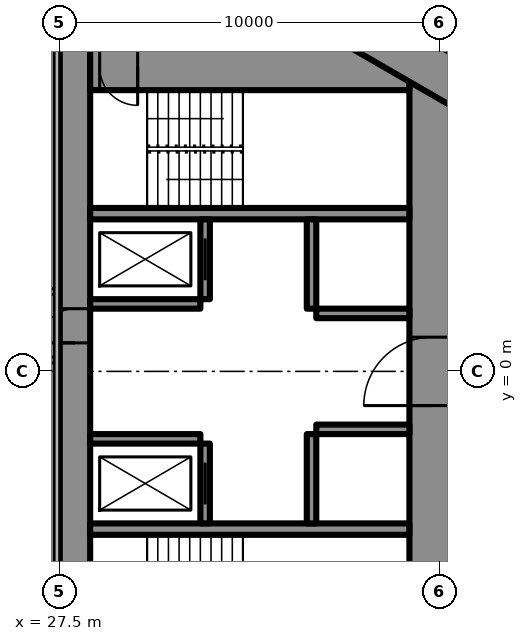
"""IFC4 building model, lengths in metres.
Left out: names, types, materials, properties, quantities, classifications, styles, units other than length and angle.
Written with IfcOpenShell. Run it as: python <this file> out.ifc"""

import sys

from ifc_helpers import new_model, si_unit, direction, frame, frame_2d, origin, place, context, subcontext, project, spatial, rectangle, extrude, element, fill, save


model = new_model("IFC4")
c1 = context("Model", 3, precision=1e-05, world=origin(), true_north=direction((0.0, 1.0)))
c2 = subcontext(c1, "Body", "Model", "MODEL_VIEW")
j1 = project(units=[si_unit("LENGTHUNIT", "METRE"), si_unit("PLANEANGLEUNIT", "RADIAN")], contexts=[c1])
p1 = place(None, origin())
s1 = spatial("IfcSite", under=j1, at=p1, CompositionType="ELEMENT")
p2 = place(p1, origin())
s2 = spatial("IfcBuilding", under=s1, at=p2, CompositionType="ELEMENT")
p3 = place(p2, frame((0.0, 0.0, 222.5)))
s3 = spatial("IfcBuildingStorey", under=s2, at=p3, CompositionType="ELEMENT", Elevation=222.5)
p4 = place(p3, frame((27.9, -8.6, 0.0), z_axis=(0.0, 0.0, 1.0), x_axis=(0.0, 1.0, 0.0)))
e1 = element("IfcWall", 1, at=p4, inside=s3, PredefinedType="SHEAR", context=c2, shape_type="SweptSolid", body=[
    extrude(rectangle(XDim=17.2, YDim=0.8, at=frame_2d((8.6, 0.0))), origin(), (0.0, 0.0, 1.0), 3.6),
])
p5 = place(p4, frame((9.35, 0.0, 0.0)))
e2 = element("IfcOpeningElement", 2, at=p5, cuts=e1, PredefinedType="OPENING", context=c2, shape_type="SweptSolid", body=[
    extrude(rectangle(XDim=0.9, YDim=2.2, at=frame_2d((0.45, 1.1))), frame((0.0, 0.41, 0.0), z_axis=(0.0, -1.0, 0.0), x_axis=(1.0, 0.0, 0.0)), (0.0, 0.0, 1.0), 0.82),
])
p6 = place(p3, frame((37.3, -8.6, 0.0), z_axis=(0.0, 0.0, 1.0), x_axis=(0.0, 1.0, 0.0)))
e3 = element("IfcWall", 3, at=p6, inside=s3, PredefinedType="SHEAR", context=c2, shape_type="SweptSolid", body=[
    extrude(rectangle(XDim=17.2, YDim=1.2, at=frame_2d((8.6, 0.0))), origin(), (0.0, 0.0, 1.0), 3.6),
])
p7 = place(p6, frame((7.7, 0.0, 0.0)))
e4 = element("IfcOpeningElement", 4, at=p7, cuts=e3, PredefinedType="OPENING", context=c2, shape_type="SweptSolid", body=[
    extrude(rectangle(XDim=1.8, YDim=2.2, at=frame_2d((0.9, 1.1))), frame((0.0, 0.61, 0.0), z_axis=(0.0, -1.0, 0.0), x_axis=(1.0, 0.0, 0.0)), (0.0, 0.0, 1.0), 1.22),
])
p8 = place(p3, frame((28.3, 8.0, 0.0), z_axis=(0.0, 0.0, 1.0), x_axis=(1.0, 0.0, 0.0)))
e5 = element("IfcWall", 5, at=p8, inside=s3, PredefinedType="SHEAR", context=c2, shape_type="SweptSolid", body=[
    extrude(rectangle(XDim=8.4, YDim=1.2, at=frame_2d((4.2, 0.0))), origin(), (0.0, 0.0, 1.0), 3.6),
])
p9 = place(p8, frame((0.25, 0.0, 0.0)))
e6 = element("IfcOpeningElement", 6, at=p9, cuts=e5, PredefinedType="OPENING", context=c2, shape_type="SweptSolid", body=[
    extrude(rectangle(XDim=1.0, YDim=2.2, at=frame_2d((0.5, 1.1))), frame((0.0, 0.61, 0.0), z_axis=(0.0, -1.0, 0.0), x_axis=(1.0, 0.0, 0.0)), (0.0, 0.0, 1.0), 1.22),
])
for number, where, z_axis, x_axis in (
    (7, (28.3, -4.15, 0.0), (0.0, 0.0, 1.0), (1.0, 0.0, 0.0)),
    (8, (28.3, 4.15, 0.0), (0.0, 0.0, 1.0), (1.0, 0.0, 0.0)),
):
    element("IfcWall", number, at=place(p3, frame(where, z_axis=z_axis, x_axis=x_axis)), inside=s3, PredefinedType="SHEAR", context=c2, shape_type="SweptSolid", body=[
        extrude(rectangle(XDim=8.4, YDim=0.3, at=frame_2d((4.2, 0.0))), origin(), (0.0, 0.0, 1.0), 3.6),
    ])
p10 = place(p3, frame((31.325, -4.0, 0.0), z_axis=(0.0, 0.0, 1.0), x_axis=(0.0, 1.0, 0.0)))
e9 = element("IfcWall", 9, at=p10, inside=s3, PredefinedType="SHEAR", context=c2, shape_type="SweptSolid", body=[
    extrude(rectangle(XDim=2.1, YDim=0.25, at=frame_2d((1.05, 0.0))), origin(), (0.0, 0.0, 1.0), 3.6),
])
p11 = place(p10, frame((0.5, 0.0, 0.0)))
e10 = element("IfcOpeningElement", 10, at=p11, cuts=e9, PredefinedType="OPENING", context=c2, shape_type="SweptSolid", body=[
    extrude(rectangle(XDim=1.1, YDim=2.2, at=frame_2d((0.55, 1.1))), frame((0.0, 0.135, 0.0), z_axis=(0.0, -1.0, 0.0), x_axis=(1.0, 0.0, 0.0)), (0.0, 0.0, 1.0), 0.27),
])
p12 = place(p3, frame((34.125, -4.0, 0.0), z_axis=(0.0, 0.0, 1.0), x_axis=(0.0, 1.0, 0.0)))
e11 = element("IfcWall", 11, at=p12, inside=s3, PredefinedType="SHEAR", context=c2, shape_type="SweptSolid", body=[
    extrude(rectangle(XDim=2.35, YDim=0.25, at=frame_2d((1.175, 0.0))), origin(), (0.0, 0.0, 1.0), 3.6),
])
p13 = place(p3, frame((28.3, -1.775, 0.0), z_axis=(0.0, 0.0, 1.0), x_axis=(1.0, 0.0, 0.0)))
e12 = element("IfcWall", 12, at=p13, inside=s3, PredefinedType="SHEAR", context=c2, shape_type="SweptSolid", body=[
    extrude(rectangle(XDim=2.9, YDim=0.25, at=frame_2d((1.45, 0.0))), origin(), (0.0, 0.0, 1.0), 3.6),
])
p14 = place(p3, frame((34.25, -1.525, 0.0), z_axis=(0.0, 0.0, 1.0), x_axis=(1.0, 0.0, 0.0)))
e13 = element("IfcWall", 13, at=p14, inside=s3, PredefinedType="SHEAR", context=c2, shape_type="SweptSolid", body=[
    extrude(rectangle(XDim=2.45, YDim=0.25, at=frame_2d((1.225, 0.0))), origin(), (0.0, 0.0, 1.0), 3.6),
])
p15 = place(p3, frame((31.325, 1.9, 0.0), z_axis=(0.0, 0.0, 1.0), x_axis=(0.0, 1.0, 0.0)))
e14 = element("IfcWall", 14, at=p15, inside=s3, PredefinedType="SHEAR", context=c2, shape_type="SweptSolid", body=[
    extrude(rectangle(XDim=2.1, YDim=0.25, at=frame_2d((1.05, 0.0))), origin(), (0.0, 0.0, 1.0), 3.6),
])
p16 = place(p15, frame((0.5, 0.0, 0.0)))
e15 = element("IfcOpeningElement", 15, at=p16, cuts=e14, PredefinedType="OPENING", context=c2, shape_type="SweptSolid", body=[
    extrude(rectangle(XDim=1.1, YDim=2.2, at=frame_2d((0.55, 1.1))), frame((0.0, 0.135, 0.0), z_axis=(0.0, -1.0, 0.0), x_axis=(1.0, 0.0, 0.0)), (0.0, 0.0, 1.0), 0.27),
])
p17 = place(p3, frame((34.125, 1.65, 0.0), z_axis=(0.0, 0.0, 1.0), x_axis=(0.0, 1.0, 0.0)))
e16 = element("IfcWall", 16, at=p17, inside=s3, PredefinedType="SHEAR", context=c2, shape_type="SweptSolid", body=[
    extrude(rectangle(XDim=2.35, YDim=0.25, at=frame_2d((1.175, 0.0))), origin(), (0.0, 0.0, 1.0), 3.6),
])
p18 = place(p3, frame((28.3, 1.775, 0.0), z_axis=(0.0, 0.0, 1.0), x_axis=(1.0, 0.0, 0.0)))
e17 = element("IfcWall", 17, at=p18, inside=s3, PredefinedType="SHEAR", context=c2, shape_type="SweptSolid", body=[
    extrude(rectangle(XDim=2.9, YDim=0.25, at=frame_2d((1.45, 0.0))), origin(), (0.0, 0.0, 1.0), 3.6),
])
p19 = place(p3, frame((34.25, 1.525, 0.0), z_axis=(0.0, 0.0, 1.0), x_axis=(1.0, 0.0, 0.0)))
e18 = element("IfcWall", 18, at=p19, inside=s3, PredefinedType="SHEAR", context=c2, shape_type="SweptSolid", body=[
    extrude(rectangle(XDim=2.45, YDim=0.25, at=frame_2d((1.225, 0.0))), origin(), (0.0, 0.0, 1.0), 3.6),
])
p20 = place(p3, frame((27.2, -13.8, 0.0), z_axis=(0.0, 0.0, 1.0), x_axis=(0.866027159892, 0.499996958321, 0.0)))
e19 = element("IfcWall", 19, at=p20, inside=s3, PredefinedType="SHEAR", context=c2, shape_type="SweptSolid", body=[
    extrude(rectangle(XDim=27.947, YDim=1.2, at=frame_2d((13.973, 0.0))), origin(), (0.0, 0.0, 1.0), 3.6),
])
p21 = place(p20, frame((4.6, 0.0, 0.0)))
e20 = element("IfcOpeningElement", 20, at=p21, cuts=e19, PredefinedType="OPENING", context=c2, shape_type="SweptSolid", body=[
    extrude(rectangle(XDim=1.0, YDim=2.2, at=frame_2d((0.5, 1.1))), frame((0.0, 0.61, 0.0), z_axis=(0.0, -1.0, 0.0), x_axis=(1.0, 0.0, 0.0)), (0.0, 0.0, 1.0), 1.22),
])
p22 = place(p20, frame((13.395, 0.0, 0.0)))
e21 = element("IfcOpeningElement", 21, at=p22, cuts=e19, PredefinedType="OPENING", context=c2, shape_type="SweptSolid", body=[
    extrude(rectangle(XDim=1.8, YDim=2.2, at=frame_2d((0.9, 1.1))), frame((0.0, 0.61, 0.0), z_axis=(0.0, -1.0, 0.0), x_axis=(1.0, 0.0, 0.0)), (0.0, 0.0, 1.0), 1.22),
])
p23 = place(p3, frame((27.2, 13.8, 0.0), z_axis=(0.0, 0.0, 1.0), x_axis=(0.866024515034, -0.500001539357, 0.0)))
e22 = element("IfcWall", 22, at=p23, inside=s3, PredefinedType="SHEAR", context=c2, shape_type="SweptSolid", body=[
    extrude(rectangle(XDim=26.907, YDim=1.2, at=frame_2d((13.454, 0.0))), origin(), (0.0, 0.0, 1.0), 3.6),
])
p24 = place(p23, frame((4.6, 0.0, 0.0)))
e23 = element("IfcOpeningElement", 23, at=p24, cuts=e22, PredefinedType="OPENING", context=c2, shape_type="SweptSolid", body=[
    extrude(rectangle(XDim=1.0, YDim=2.2, at=frame_2d((0.5, 1.1))), frame((0.0, 0.61, 0.0), z_axis=(0.0, -1.0, 0.0), x_axis=(1.0, 0.0, 0.0)), (0.0, 0.0, 1.0), 1.22),
])
p25 = place(p23, frame((13.395, 0.0, 0.0)))
e24 = element("IfcOpeningElement", 24, at=p25, cuts=e22, PredefinedType="OPENING", context=c2, shape_type="SweptSolid", body=[
    extrude(rectangle(XDim=1.8, YDim=2.2, at=frame_2d((0.9, 1.1))), frame((0.0, 0.61, 0.0), z_axis=(0.0, -1.0, 0.0), x_axis=(1.0, 0.0, 0.0)), (0.0, 0.0, 1.0), 1.22),
])
p26 = place(p3, frame((28.959, -15.44, 0.0), z_axis=(0.0, 0.0, 1.0), x_axis=(0.866025227435, 0.500000305447, 0.0)))
e25 = element("IfcWall", 25, at=p26, inside=s3, PredefinedType="PARTITIONING", context=c2, shape_type="SweptSolid", body=[
    extrude(rectangle(XDim=30.88, YDim=0.2, at=frame_2d((15.44, 0.0))), origin(), (0.0, 0.0, 1.0), 3.35),
])
p27 = place(p26, frame((1.494, 0.0, 0.0)))
e26 = element("IfcOpeningElement", 26, at=p27, cuts=e25, PredefinedType="OPENING", context=c2, shape_type="SweptSolid", body=[
    extrude(rectangle(XDim=1.8, YDim=2.03, at=frame_2d((0.9, 1.015))), frame((0.0, 0.11, 0.0), z_axis=(0.0, -1.0, 0.0), x_axis=(1.0, 0.0, 0.0)), (0.0, 0.0, 1.0), 0.22),
])
p28 = place(p26, frame((7.687, 0.0, 0.0)))
e27 = element("IfcOpeningElement", 27, at=p28, cuts=e25, PredefinedType="OPENING", context=c2, shape_type="SweptSolid", body=[
    extrude(rectangle(XDim=1.0, YDim=2.2, at=frame_2d((0.5, 1.1))), frame((0.0, 0.11, 0.0), z_axis=(0.0, -1.0, 0.0), x_axis=(1.0, 0.0, 0.0)), (0.0, 0.0, 1.0), 0.22),
])
p29 = place(p26, frame((16.137, 0.0, 0.0)))
e28 = element("IfcOpeningElement", 28, at=p29, cuts=e25, PredefinedType="OPENING", context=c2, shape_type="SweptSolid", body=[
    extrude(rectangle(XDim=0.95, YDim=2.2, at=frame_2d((0.475, 1.1))), frame((0.0, 0.11, 0.0), z_axis=(0.0, -1.0, 0.0), x_axis=(1.0, 0.0, 0.0)), (0.0, 0.0, 1.0), 0.22),
])
p30 = place(p26, frame((20.021, 0.0, 0.0)))
e29 = element("IfcOpeningElement", 29, at=p30, cuts=e25, PredefinedType="OPENING", context=c2, shape_type="SweptSolid", body=[
    extrude(rectangle(XDim=0.95, YDim=2.2, at=frame_2d((0.475, 1.1))), frame((0.0, 0.11, 0.0), z_axis=(0.0, -1.0, 0.0), x_axis=(1.0, 0.0, 0.0)), (0.0, 0.0, 1.0), 0.22),
])
p31 = place(p26, frame((26.253, 0.0, 0.0)))
e30 = element("IfcOpeningElement", 30, at=p31, cuts=e25, PredefinedType="OPENING", context=c2, shape_type="SweptSolid", body=[
    extrude(rectangle(XDim=0.95, YDim=2.2, at=frame_2d((0.475, 1.1))), frame((0.0, 0.11, 0.0), z_axis=(0.0, -1.0, 0.0), x_axis=(1.0, 0.0, 0.0)), (0.0, 0.0, 1.0), 0.22),
])
p32 = place(p3, frame((28.959, 15.44, 0.0), z_axis=(0.0, 0.0, 1.0), x_axis=(0.866028936079, -0.499993881836, 0.0)))
e31 = element("IfcWall", 31, at=p32, inside=s3, PredefinedType="PARTITIONING", context=c2, shape_type="SweptSolid", body=[
    extrude(rectangle(XDim=20.503, YDim=0.2, at=frame_2d((10.251, 0.0))), origin(), (0.0, 0.0, 1.0), 3.35),
])
p33 = place(p32, frame((16.603, 0.0, 0.0)))
e32 = element("IfcOpeningElement", 32, at=p33, cuts=e31, PredefinedType="OPENING", context=c2, shape_type="SweptSolid", body=[
    extrude(rectangle(XDim=0.95, YDim=2.2, at=frame_2d((0.475, 1.1))), frame((0.0, 0.11, 0.0), z_axis=(0.0, -1.0, 0.0), x_axis=(1.0, 0.0, 0.0)), (0.0, 0.0, 1.0), 0.22),
])
p34 = place(p32, frame((7.287, 0.0, 0.0)))
e33 = element("IfcOpeningElement", 33, at=p34, cuts=e31, PredefinedType="OPENING", context=c2, shape_type="SweptSolid", body=[
    extrude(rectangle(XDim=0.95, YDim=2.2, at=frame_2d((0.475, 1.1))), frame((0.0, 0.11, 0.0), z_axis=(0.0, -1.0, 0.0), x_axis=(1.0, 0.0, 0.0)), (0.0, 0.0, 1.0), 0.22),
])
p35 = place(p32, frame((2.244, 0.0, 0.0)))
e34 = element("IfcOpeningElement", 34, at=p35, cuts=e31, PredefinedType="OPENING", context=c2, shape_type="SweptSolid", body=[
    extrude(rectangle(XDim=1.8, YDim=2.03, at=frame_2d((0.9, 1.015))), frame((0.0, 0.11, 0.0), z_axis=(0.0, -1.0, 0.0), x_axis=(1.0, 0.0, 0.0)), (0.0, 0.0, 1.0), 0.22),
])
p36 = place(p3, frame((-27.5, 0.3, 0.0), z_axis=(0.0, 0.0, 1.0), x_axis=(1.0, 0.0, 0.0)))
e35 = element("IfcWall", 35, at=p36, inside=s3, PredefinedType="PARTITIONING", context=c2, shape_type="SweptSolid", body=[
    extrude(rectangle(XDim=55.0, YDim=0.15, at=frame_2d((27.5, 0.0))), origin(), (0.0, 0.0, 1.0), 2.4),
])
p37 = place(p36, frame((1.575, 0.0, 0.0)))
e36 = element("IfcOpeningElement", 36, at=p37, cuts=e35, PredefinedType="OPENING", context=c2, shape_type="SweptSolid", body=[
    extrude(rectangle(XDim=1.0, YDim=2.2, at=frame_2d((0.5, 1.1))), frame((0.0, 0.085, 0.0), z_axis=(0.0, -1.0, 0.0), x_axis=(1.0, 0.0, 0.0)), (0.0, 0.0, 1.0), 0.17),
])
p38 = place(p36, frame((8.525, 0.0, 0.0)))
e37 = element("IfcOpeningElement", 37, at=p38, cuts=e35, PredefinedType="OPENING", context=c2, shape_type="SweptSolid", body=[
    extrude(rectangle(XDim=1.05, YDim=2.4, at=frame_2d((0.525, 1.2))), frame((0.0, 0.085, 0.0), z_axis=(0.0, -1.0, 0.0), x_axis=(1.0, 0.0, 0.0)), (0.0, 0.0, 1.0), 0.17),
])
p39 = place(p36, frame((14.025, 0.0, 0.0)))
e38 = element("IfcOpeningElement", 38, at=p39, cuts=e35, PredefinedType="OPENING", context=c2, shape_type="SweptSolid", body=[
    extrude(rectangle(XDim=1.05, YDim=2.4, at=frame_2d((0.525, 1.2))), frame((0.0, 0.085, 0.0), z_axis=(0.0, -1.0, 0.0), x_axis=(1.0, 0.0, 0.0)), (0.0, 0.0, 1.0), 0.17),
])
p40 = place(p36, frame((19.525, 0.0, 0.0)))
e39 = element("IfcOpeningElement", 39, at=p40, cuts=e35, PredefinedType="OPENING", context=c2, shape_type="SweptSolid", body=[
    extrude(rectangle(XDim=1.05, YDim=2.4, at=frame_2d((0.525, 1.2))), frame((0.0, 0.085, 0.0), z_axis=(0.0, -1.0, 0.0), x_axis=(1.0, 0.0, 0.0)), (0.0, 0.0, 1.0), 0.17),
])
p41 = place(p36, frame((25.025, 0.0, 0.0)))
e40 = element("IfcOpeningElement", 40, at=p41, cuts=e35, PredefinedType="OPENING", context=c2, shape_type="SweptSolid", body=[
    extrude(rectangle(XDim=1.05, YDim=2.4, at=frame_2d((0.525, 1.2))), frame((0.0, 0.085, 0.0), z_axis=(0.0, -1.0, 0.0), x_axis=(1.0, 0.0, 0.0)), (0.0, 0.0, 1.0), 0.17),
])
p42 = place(p36, frame((30.525, 0.0, 0.0)))
e41 = element("IfcOpeningElement", 41, at=p42, cuts=e35, PredefinedType="OPENING", context=c2, shape_type="SweptSolid", body=[
    extrude(rectangle(XDim=1.05, YDim=2.4, at=frame_2d((0.525, 1.2))), frame((0.0, 0.085, 0.0), z_axis=(0.0, -1.0, 0.0), x_axis=(1.0, 0.0, 0.0)), (0.0, 0.0, 1.0), 0.17),
])
p43 = place(p36, frame((36.025, 0.0, 0.0)))
e42 = element("IfcOpeningElement", 42, at=p43, cuts=e35, PredefinedType="OPENING", context=c2, shape_type="SweptSolid", body=[
    extrude(rectangle(XDim=1.05, YDim=2.4, at=frame_2d((0.525, 1.2))), frame((0.0, 0.085, 0.0), z_axis=(0.0, -1.0, 0.0), x_axis=(1.0, 0.0, 0.0)), (0.0, 0.0, 1.0), 0.17),
])
p44 = place(p36, frame((41.525, 0.0, 0.0)))
e43 = element("IfcOpeningElement", 43, at=p44, cuts=e35, PredefinedType="OPENING", context=c2, shape_type="SweptSolid", body=[
    extrude(rectangle(XDim=1.05, YDim=2.4, at=frame_2d((0.525, 1.2))), frame((0.0, 0.085, 0.0), z_axis=(0.0, -1.0, 0.0), x_axis=(1.0, 0.0, 0.0)), (0.0, 0.0, 1.0), 0.17),
])
p45 = place(p36, frame((47.025, 0.0, 0.0)))
e44 = element("IfcOpeningElement", 44, at=p45, cuts=e35, PredefinedType="OPENING", context=c2, shape_type="SweptSolid", body=[
    extrude(rectangle(XDim=1.05, YDim=2.4, at=frame_2d((0.525, 1.2))), frame((0.0, 0.085, 0.0), z_axis=(0.0, -1.0, 0.0), x_axis=(1.0, 0.0, 0.0)), (0.0, 0.0, 1.0), 0.17),
])
p46 = place(p36, frame((52.525, 0.0, 0.0)))
e45 = element("IfcOpeningElement", 45, at=p46, cuts=e35, PredefinedType="OPENING", context=c2, shape_type="SweptSolid", body=[
    extrude(rectangle(XDim=1.05, YDim=2.4, at=frame_2d((0.525, 1.2))), frame((0.0, 0.085, 0.0), z_axis=(0.0, -1.0, 0.0), x_axis=(1.0, 0.0, 0.0)), (0.0, 0.0, 1.0), 0.17),
])
p47 = place(p3, frame((-27.5, 2.1, 0.0), z_axis=(0.0, 0.0, 1.0), x_axis=(1.0, 0.0, 0.0)))
e46 = element("IfcWall", 46, at=p47, inside=s3, PredefinedType="PARTITIONING", context=c2, shape_type="SweptSolid", body=[
    extrude(rectangle(XDim=55.0, YDim=0.15, at=frame_2d((27.5, 0.0))), origin(), (0.0, 0.0, 1.0), 3.4),
])
p48 = place(p47, frame((2.025, 0.0, 0.0)))
e47 = element("IfcOpeningElement", 47, at=p48, cuts=e46, PredefinedType="OPENING", context=c2, shape_type="SweptSolid", body=[
    extrude(rectangle(XDim=1.05, YDim=2.4, at=frame_2d((0.525, 1.2))), frame((0.0, 0.085, 0.0), z_axis=(0.0, -1.0, 0.0), x_axis=(1.0, 0.0, 0.0)), (0.0, 0.0, 1.0), 0.17),
])
p49 = place(p47, frame((8.525, 0.0, 0.0)))
e48 = element("IfcOpeningElement", 48, at=p49, cuts=e46, PredefinedType="OPENING", context=c2, shape_type="SweptSolid", body=[
    extrude(rectangle(XDim=1.05, YDim=2.4, at=frame_2d((0.525, 1.2))), frame((0.0, 0.085, 0.0), z_axis=(0.0, -1.0, 0.0), x_axis=(1.0, 0.0, 0.0)), (0.0, 0.0, 1.0), 0.17),
])
p50 = place(p47, frame((14.025, 0.0, 0.0)))
e49 = element("IfcOpeningElement", 49, at=p50, cuts=e46, PredefinedType="OPENING", context=c2, shape_type="SweptSolid", body=[
    extrude(rectangle(XDim=1.05, YDim=2.4, at=frame_2d((0.525, 1.2))), frame((0.0, 0.085, 0.0), z_axis=(0.0, -1.0, 0.0), x_axis=(1.0, 0.0, 0.0)), (0.0, 0.0, 1.0), 0.17),
])
p51 = place(p47, frame((19.525, 0.0, 0.0)))
e50 = element("IfcOpeningElement", 50, at=p51, cuts=e46, PredefinedType="OPENING", context=c2, shape_type="SweptSolid", body=[
    extrude(rectangle(XDim=1.05, YDim=2.4, at=frame_2d((0.525, 1.2))), frame((0.0, 0.085, 0.0), z_axis=(0.0, -1.0, 0.0), x_axis=(1.0, 0.0, 0.0)), (0.0, 0.0, 1.0), 0.17),
])
p52 = place(p47, frame((25.025, 0.0, 0.0)))
e51 = element("IfcOpeningElement", 51, at=p52, cuts=e46, PredefinedType="OPENING", context=c2, shape_type="SweptSolid", body=[
    extrude(rectangle(XDim=1.05, YDim=2.4, at=frame_2d((0.525, 1.2))), frame((0.0, 0.085, 0.0), z_axis=(0.0, -1.0, 0.0), x_axis=(1.0, 0.0, 0.0)), (0.0, 0.0, 1.0), 0.17),
])
p53 = place(p47, frame((30.525, 0.0, 0.0)))
e52 = element("IfcOpeningElement", 52, at=p53, cuts=e46, PredefinedType="OPENING", context=c2, shape_type="SweptSolid", body=[
    extrude(rectangle(XDim=1.05, YDim=2.4, at=frame_2d((0.525, 1.2))), frame((0.0, 0.085, 0.0), z_axis=(0.0, -1.0, 0.0), x_axis=(1.0, 0.0, 0.0)), (0.0, 0.0, 1.0), 0.17),
])
p54 = place(p47, frame((36.025, 0.0, 0.0)))
e53 = element("IfcOpeningElement", 53, at=p54, cuts=e46, PredefinedType="OPENING", context=c2, shape_type="SweptSolid", body=[
    extrude(rectangle(XDim=1.05, YDim=2.4, at=frame_2d((0.525, 1.2))), frame((0.0, 0.085, 0.0), z_axis=(0.0, -1.0, 0.0), x_axis=(1.0, 0.0, 0.0)), (0.0, 0.0, 1.0), 0.17),
])
p55 = place(p47, frame((41.525, 0.0, 0.0)))
e54 = element("IfcOpeningElement", 54, at=p55, cuts=e46, PredefinedType="OPENING", context=c2, shape_type="SweptSolid", body=[
    extrude(rectangle(XDim=1.05, YDim=2.4, at=frame_2d((0.525, 1.2))), frame((0.0, 0.085, 0.0), z_axis=(0.0, -1.0, 0.0), x_axis=(1.0, 0.0, 0.0)), (0.0, 0.0, 1.0), 0.17),
])
p56 = place(p47, frame((47.025, 0.0, 0.0)))
e55 = element("IfcOpeningElement", 55, at=p56, cuts=e46, PredefinedType="OPENING", context=c2, shape_type="SweptSolid", body=[
    extrude(rectangle(XDim=1.05, YDim=2.4, at=frame_2d((0.525, 1.2))), frame((0.0, 0.085, 0.0), z_axis=(0.0, -1.0, 0.0), x_axis=(1.0, 0.0, 0.0)), (0.0, 0.0, 1.0), 0.17),
])
p57 = place(p47, frame((52.525, 0.0, 0.0)))
e56 = element("IfcOpeningElement", 56, at=p57, cuts=e46, PredefinedType="OPENING", context=c2, shape_type="SweptSolid", body=[
    extrude(rectangle(XDim=1.05, YDim=2.4, at=frame_2d((0.525, 1.2))), frame((0.0, 0.085, 0.0), z_axis=(0.0, -1.0, 0.0), x_axis=(1.0, 0.0, 0.0)), (0.0, 0.0, 1.0), 0.17),
])
p58 = place(p7, origin())
e57 = element("IfcDoor", 57, at=p58, inside=s3, OperationType="DOUBLE_DOOR_SINGLE_SWING", PredefinedType="DOOR", context=c2, shape_type="SweptSolid", body=[
    extrude(rectangle(XDim=1.8, YDim=2.2, at=frame_2d((0.9, 1.1))), frame((0.0, 0.025, 0.0), z_axis=(0.0, -1.0, 0.0), x_axis=(1.0, 0.0, 0.0)), (0.0, 0.0, 1.0), 0.05),
])
fill(e4, e57)
p59 = place(p9, origin())
e58 = element("IfcDoor", 58, at=p59, inside=s3, OperationType="SINGLE_SWING_RIGHT", PredefinedType="DOOR", context=c2, shape_type="SweptSolid", body=[
    extrude(rectangle(XDim=1.0, YDim=2.2, at=frame_2d((0.5, 1.1))), frame((0.0, 0.025, 0.0), z_axis=(0.0, -1.0, 0.0), x_axis=(1.0, 0.0, 0.0)), (0.0, 0.0, 1.0), 0.05),
])
fill(e6, e58)
p60 = place(p5, origin())
e59 = element("IfcDoor", 59, at=p60, inside=s3, OperationType="SINGLE_SWING_LEFT", PredefinedType="DOOR", context=c2, shape_type="SweptSolid", body=[
    extrude(rectangle(XDim=0.9, YDim=2.2, at=frame_2d((0.45, 1.1))), frame((0.0, 0.025, 0.0), z_axis=(0.0, -1.0, 0.0), x_axis=(1.0, 0.0, 0.0)), (0.0, 0.0, 1.0), 0.05),
])
fill(e2, e59)
p61 = place(p11, origin())
e60 = element("IfcDoor", 60, at=p61, inside=s3, OperationType="SLIDING_TO_LEFT", PredefinedType="USERDEFINED", context=c2, shape_type="SweptSolid", body=[
    extrude(rectangle(XDim=1.1, YDim=2.2, at=frame_2d((0.55, 1.1))), frame((0.0, 0.025, 0.0), z_axis=(0.0, -1.0, 0.0), x_axis=(1.0, 0.0, 0.0)), (0.0, 0.0, 1.0), 0.05),
])
fill(e10, e60)
p62 = place(p16, origin())
e61 = element("IfcDoor", 61, at=p62, inside=s3, OperationType="SLIDING_TO_LEFT", PredefinedType="USERDEFINED", context=c2, shape_type="SweptSolid", body=[
    extrude(rectangle(XDim=1.1, YDim=2.2, at=frame_2d((0.55, 1.1))), frame((0.0, 0.025, 0.0), z_axis=(0.0, -1.0, 0.0), x_axis=(1.0, 0.0, 0.0)), (0.0, 0.0, 1.0), 0.05),
])
fill(e15, e61)
save(model, sys.argv[1])
